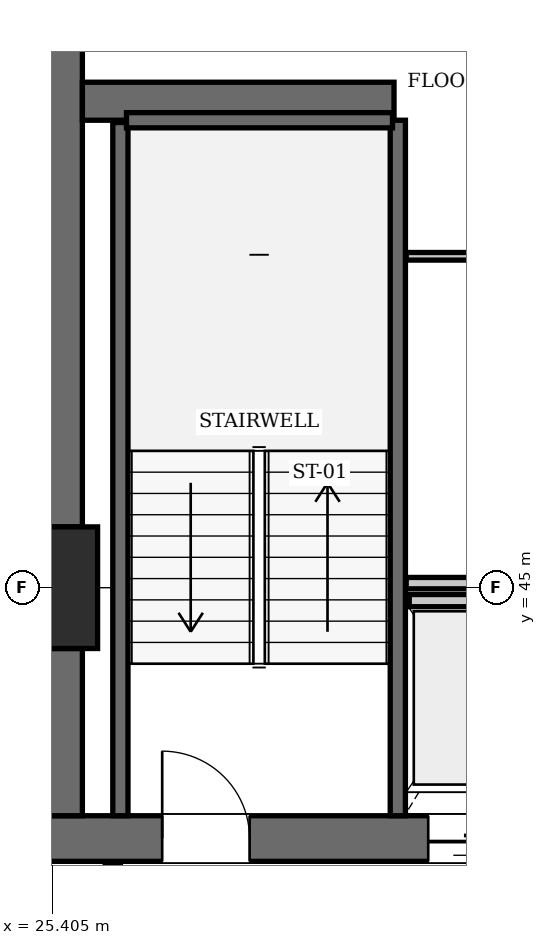
"""IFC4 building model, lengths in metres.
Left out: names, types, materials, properties, quantities, classifications, styles, units other than length and angle.
Written with IfcOpenShell. Run it as: python <this file> out.ifc"""

import sys

from ifc_helpers import new_model, si_unit, direction, frame, frame_2d, origin, origin_2d, place, context, subcontext, project, spatial, rectangle, extrude, element, fill, save


model = new_model("IFC4")
c1 = context("Model", 3, precision=1e-05, world=origin(), true_north=direction((0.0, 1.0)))
c2 = subcontext(c1, "Body", "Model", "MODEL_VIEW")
j1 = project(units=[si_unit("LENGTHUNIT", "METRE"), si_unit("PLANEANGLEUNIT", "RADIAN")], contexts=[c1])
p1 = place(None, origin())
s1 = spatial("IfcSite", under=j1, at=p1, CompositionType="ELEMENT")
p2 = place(p1, origin())
s2 = spatial("IfcBuilding", under=s1, at=p2, CompositionType="ELEMENT")
p3 = place(p2, frame((0.0, 0.0, 254.8)))
s3 = spatial("IfcBuildingStorey", under=s2, at=p3, CompositionType="ELEMENT", Elevation=254.8)
p4 = place(p3, frame((25.2, 45.0, 0.0), z_axis=(0.0, 0.0, 1.0), x_axis=(1.0, 0.0, 0.0)))
e1 = element("IfcColumn", 1, at=p4, inside=s3, PredefinedType="COLUMN", context=c2, shape_type="SweptSolid", body=[
    extrude(rectangle(XDim=1.6, YDim=1.6, at=origin_2d()), origin(), (0.0, 0.0, 1.0), 3.85),
])
p5 = place(p3, frame((25.2, 41.7, 0.0), z_axis=(0.0, 0.0, 1.0), x_axis=(1.0, 0.0, 0.0)))
e2 = element("IfcWall", 2, at=p5, inside=s3, PredefinedType="SHEAR", context=c2, shape_type="SweptSolid", body=[
    extrude(rectangle(XDim=6.8, YDim=0.6, at=frame_2d((3.4, 0.0))), origin(), (0.0, 0.0, 1.0), 3.85),
])
p6 = place(p5, frame((1.65, 0.0, 0.0)))
e3 = element("IfcOpeningElement", 3, at=p6, cuts=e2, PredefinedType="OPENING", context=c2, shape_type="SweptSolid", body=[
    extrude(rectangle(XDim=1.15, YDim=2.15, at=frame_2d((0.575, 1.075))), frame((0.0, 0.31, 0.0), z_axis=(0.0, -1.0, 0.0), x_axis=(1.0, 0.0, 0.0)), (0.0, 0.0, 1.0), 0.62),
])
p7 = place(p5, frame((5.15, 0.0, 0.0)))
e4 = element("IfcOpeningElement", 4, at=p7, cuts=e2, PredefinedType="OPENING", context=c2, shape_type="SweptSolid", body=[
    extrude(rectangle(XDim=1.1, YDim=2.2, at=frame_2d((0.55, 1.1))), frame((0.0, 0.31, 0.0), z_axis=(0.0, -1.0, 0.0), x_axis=(1.0, 0.0, 0.0)), (0.0, 0.0, 1.0), 0.62),
])
p8 = place(p3, frame((25.5, 42.0, 0.0), z_axis=(0.0, 0.0, 1.0), x_axis=(0.0, 1.0, 0.0)))
e5 = element("IfcWall", 5, at=p8, inside=s3, PredefinedType="SHEAR", context=c2, shape_type="SweptSolid", body=[
    extrude(rectangle(XDim=2.2, YDim=0.6, at=frame_2d((1.1, 0.0))), origin(), (0.0, 0.0, 1.0), 3.85),
])
p9 = place(p3, frame((25.5, 45.8, 0.0), z_axis=(0.0, 0.0, 1.0), x_axis=(0.0, 1.0, 0.0)))
e6 = element("IfcWall", 6, at=p9, inside=s3, PredefinedType="SHEAR", context=c2, shape_type="SweptSolid", body=[
    extrude(rectangle(XDim=7.6, YDim=0.6, at=frame_2d((3.8, 0.0))), origin(), (0.0, 0.0, 1.0), 3.85),
])
p10 = place(p3, frame((25.8, 51.4, 0.0), z_axis=(0.0, 0.0, 1.0), x_axis=(1.0, 0.0, 0.0)))
e7 = element("IfcWall", 7, at=p10, inside=s3, PredefinedType="SHEAR", context=c2, shape_type="SweptSolid", body=[
    extrude(rectangle(XDim=4.1, YDim=0.5, at=frame_2d((2.05, 0.0))), origin(), (0.0, 0.0, 1.0), 3.85),
])
p11 = place(p3, frame((29.95, 42.0, 0.0), z_axis=(0.0, 0.0, 1.0), x_axis=(0.0, 1.0, 0.0)))
e8 = element("IfcWall", 8, at=p11, inside=s3, PredefinedType="SOLIDWALL", context=c2, shape_type="SweptSolid", body=[
    extrude(rectangle(XDim=9.15, YDim=0.2, at=frame_2d((4.575, 0.0))), origin(), (0.0, 0.0, 1.0), 3.61),
])
p12 = place(p3, frame((26.3, 42.0, 0.0), z_axis=(0.0, 0.0, 1.0), x_axis=(0.0, 1.0, 0.0)))
e9 = element("IfcWall", 9, at=p12, inside=s3, PredefinedType="SOLIDWALL", context=c2, shape_type="SweptSolid", body=[
    extrude(rectangle(XDim=9.12, YDim=0.2, at=frame_2d((4.56, 0.0))), origin(), (0.0, 0.0, 1.0), 3.61),
])
p13 = place(p3, frame((26.38, 51.15, 0.0), z_axis=(0.0, 0.0, 1.0), x_axis=(1.0, 0.0, 0.0)))
e10 = element("IfcWall", 10, at=p13, inside=s3, PredefinedType="SOLIDWALL", context=c2, shape_type="SweptSolid", body=[
    extrude(rectangle(XDim=3.5, YDim=0.2, at=frame_2d((1.75, 0.0))), origin(), (0.0, 0.0, 1.0), 3.61),
])
p14 = place(p3, frame((30.1, 44.83, 0.0), z_axis=(0.0, 0.0, 1.0), x_axis=(1.0, 0.0, 0.0)))
e11 = element("IfcWall", 11, at=p14, inside=s3, PredefinedType="SOLIDWALL", context=c2, shape_type="SweptSolid", body=[
    extrude(rectangle(XDim=1.6, YDim=0.16, at=frame_2d((0.8, 0.0))), origin(), (0.0, 0.0, 1.0), 3.61),
])
p15 = place(p3, frame((26.2, 38.31, 0.0), z_axis=(0.0, 0.0, 1.0), x_axis=(0.0, 1.0, 0.0)))
e12 = element("IfcWall", 12, at=p15, inside=s3, PredefinedType="PARTITIONING", context=c2, shape_type="SweptSolid", body=[
    extrude(rectangle(XDim=3.07, YDim=0.2, at=frame_2d((1.535, 0.0))), origin(), (0.0, 0.0, 1.0), 3.61),
])
p16 = place(p3, frame((30.06, 45.06, 0.0), z_axis=(0.0, 0.0, 1.0), x_axis=(1.0, 0.0, 0.0)))
e13 = element("IfcWall", 13, at=p16, inside=s3, PredefinedType="PARTITIONING", context=c2, shape_type="SweptSolid", body=[
    extrude(rectangle(XDim=3.18, YDim=0.15, at=frame_2d((1.59, 0.0))), origin(), (0.0, 0.0, 1.0), 3.61),
])
p17 = place(p3, frame((30.06, 49.36, 0.0), z_axis=(0.0, 0.0, 1.0), x_axis=(1.0, 0.0, 0.0)))
e14 = element("IfcWall", 14, at=p17, inside=s3, PredefinedType="PARTITIONING", context=c2, shape_type="SweptSolid", body=[
    extrude(rectangle(XDim=3.18, YDim=0.1, at=frame_2d((1.59, 0.0))), origin(), (0.0, 0.0, 1.0), 3.61),
])
p18 = place(p17, frame((1.95, 0.0, 0.0)))
e15 = element("IfcOpeningElement", 15, at=p18, cuts=e14, PredefinedType="OPENING", context=c2, shape_type="SweptSolid", body=[
    extrude(rectangle(XDim=0.8, YDim=2.05, at=frame_2d((0.4, 1.025))), frame((0.0, 0.06, 0.0), z_axis=(0.0, -1.0, 0.0), x_axis=(1.0, 0.0, 0.0)), (0.0, 0.0, 1.0), 0.12),
])
p19 = place(p6, origin())
e16 = element("IfcDoor", 16, at=p19, inside=s3, OperationType="SINGLE_SWING_LEFT", PredefinedType="DOOR", context=c2, shape_type="SweptSolid", body=[
    extrude(rectangle(XDim=1.15, YDim=2.15, at=frame_2d((0.575, 1.075))), frame((0.0, 0.025, 0.0), z_axis=(0.0, -1.0, 0.0), x_axis=(1.0, 0.0, 0.0)), (0.0, 0.0, 1.0), 0.05),
])
fill(e3, e16)
p20 = place(p7, frame((1.1, 0.0, 0.0), z_axis=(0.0, 0.0, 1.0), x_axis=(-1.0, 0.0, 0.0)))
e17 = element("IfcDoor", 17, at=p20, inside=s3, OperationType="SLIDING_TO_LEFT", PredefinedType="DOOR", context=c2, shape_type="SweptSolid", body=[
    extrude(rectangle(XDim=1.1, YDim=2.2, at=frame_2d((0.55, 1.1))), frame((0.0, 0.025, 0.0), z_axis=(0.0, -1.0, 0.0), x_axis=(1.0, 0.0, 0.0)), (0.0, 0.0, 1.0), 0.05),
])
fill(e4, e17)
save(model, sys.argv[1])
